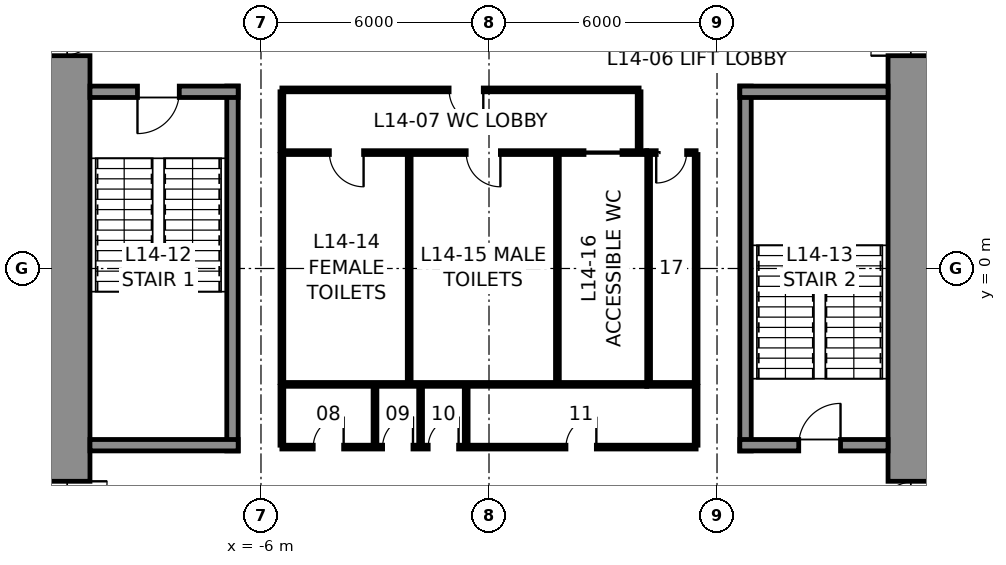
"""IFC4 building model, lengths in metres.
Left out: names, types, materials, properties, quantities, classifications, styles, units other than length and angle.
Written with IfcOpenShell. Run it as: python <this file> out.ifc"""

import sys

from ifc_helpers import new_model, si_unit, direction, frame, frame_2d, origin, place, context, subcontext, project, spatial, rectangle, extrude, element, fill, save


model = new_model("IFC4")
c1 = context("Model", 3, precision=1e-05, world=origin(), true_north=direction((0.0, 1.0)))
c2 = subcontext(c1, "Body", "Model", "MODEL_VIEW")
j1 = project(units=[si_unit("LENGTHUNIT", "METRE"), si_unit("PLANEANGLEUNIT", "RADIAN")], contexts=[c1])
p1 = place(None, origin())
s1 = spatial("IfcSite", under=j1, at=p1, CompositionType="ELEMENT")
p2 = place(p1, origin())
s2 = spatial("IfcBuilding", under=s1, at=p2, CompositionType="ELEMENT")
p3 = place(p2, frame((0.0, 0.0, 76.0)))
s3 = spatial("IfcBuildingStorey", under=s2, at=p3, CompositionType="ELEMENT", Elevation=76.0)
p4 = place(p3, frame((11.25, 10.5, 0.0), z_axis=(0.0, 0.0, 1.0), x_axis=(0.0, -1.0, 0.0)))
e1 = element("IfcWall", 1, at=p4, inside=s3, PredefinedType="SHEAR", context=c2, shape_type="SweptSolid", body=[
    extrude(rectangle(XDim=21.0, YDim=1.5, at=frame_2d((10.5, 0.0))), origin(), (0.0, 0.0, 1.0), 5.0),
])
p5 = place(p4, frame((3.7, 0.0, 0.0)))
e2 = element("IfcOpeningElement", 2, at=p5, cuts=e1, PredefinedType="OPENING", context=c2, shape_type="SweptSolid", body=[
    extrude(rectangle(XDim=1.2, YDim=2.3, at=frame_2d((0.6, 1.15))), frame((0.0, 0.76, 0.0), z_axis=(0.0, -1.0, 0.0), x_axis=(1.0, 0.0, 0.0)), (0.0, 0.0, 1.0), 1.52),
])
p6 = place(p4, frame((16.1, 0.0, 0.0)))
e3 = element("IfcOpeningElement", 3, at=p6, cuts=e1, PredefinedType="OPENING", context=c2, shape_type="SweptSolid", body=[
    extrude(rectangle(XDim=1.2, YDim=2.3, at=frame_2d((0.6, 1.15))), frame((0.0, 0.76, 0.0), z_axis=(0.0, -1.0, 0.0), x_axis=(1.0, 0.0, 0.0)), (0.0, 0.0, 1.0), 1.52),
])
p7 = place(p3, frame((-11.25, -10.5, 0.0), z_axis=(0.0, 0.0, 1.0), x_axis=(0.0, 1.0, 0.0)))
e4 = element("IfcWall", 4, at=p7, inside=s3, PredefinedType="SHEAR", context=c2, shape_type="SweptSolid", body=[
    extrude(rectangle(XDim=21.0, YDim=1.5, at=frame_2d((10.5, 0.0))), origin(), (0.0, 0.0, 1.0), 5.0),
])
p8 = place(p7, frame((16.1, 0.0, 0.0)))
e5 = element("IfcOpeningElement", 5, at=p8, cuts=e4, PredefinedType="OPENING", context=c2, shape_type="SweptSolid", body=[
    extrude(rectangle(XDim=1.2, YDim=2.3, at=frame_2d((0.6, 1.15))), frame((0.0, 0.76, 0.0), z_axis=(0.0, -1.0, 0.0), x_axis=(1.0, 0.0, 0.0)), (0.0, 0.0, 1.0), 1.52),
])
p9 = place(p7, frame((3.7, 0.0, 0.0)))
e6 = element("IfcOpeningElement", 6, at=p9, cuts=e4, PredefinedType="OPENING", context=c2, shape_type="SweptSolid", body=[
    extrude(rectangle(XDim=1.2, YDim=2.3, at=frame_2d((0.6, 1.15))), frame((0.0, 0.76, 0.0), z_axis=(0.0, -1.0, 0.0), x_axis=(1.0, 0.0, 0.0)), (0.0, 0.0, 1.0), 1.52),
])
p10 = place(p3, frame((-6.75, -4.8, 0.0), z_axis=(0.0, 0.0, 1.0), x_axis=(0.0, 1.0, 0.0)))
e7 = element("IfcWall", 7, at=p10, inside=s3, PredefinedType="SOLIDWALL", context=c2, shape_type="SweptSolid", body=[
    extrude(rectangle(XDim=9.6, YDim=0.3, at=frame_2d((4.8, 0.0))), origin(), (0.0, 0.0, 1.0), 4.75),
])
p11 = place(p3, frame((-10.5, 4.65, 0.0), z_axis=(0.0, 0.0, 1.0), x_axis=(1.0, 0.0, 0.0)))
e8 = element("IfcWall", 8, at=p11, inside=s3, PredefinedType="SOLIDWALL", context=c2, shape_type="SweptSolid", body=[
    extrude(rectangle(XDim=3.9, YDim=0.3, at=frame_2d((1.95, 0.0))), origin(), (0.0, 0.0, 1.0), 4.75),
])
p12 = place(p11, frame((1.25, 0.0, 0.0)))
e9 = element("IfcOpeningElement", 9, at=p12, cuts=e8, PredefinedType="OPENING", context=c2, shape_type="SweptSolid", body=[
    extrude(rectangle(XDim=1.1, YDim=2.3, at=frame_2d((0.55, 1.15))), frame((0.0, 0.16, 0.0), z_axis=(0.0, -1.0, 0.0), x_axis=(1.0, 0.0, 0.0)), (0.0, 0.0, 1.0), 0.32),
])
p13 = place(p3, frame((-6.6, -4.65, 0.0), z_axis=(0.0, 0.0, 1.0), x_axis=(-1.0, 0.0, 0.0)))
e10 = element("IfcWall", 10, at=p13, inside=s3, PredefinedType="SOLIDWALL", context=c2, shape_type="SweptSolid", body=[
    extrude(rectangle(XDim=3.9, YDim=0.3, at=frame_2d((1.95, 0.0))), origin(), (0.0, 0.0, 1.0), 4.75),
])
p14 = place(p3, frame((6.75, -4.8, 0.0), z_axis=(0.0, 0.0, 1.0), x_axis=(0.0, 1.0, 0.0)))
e11 = element("IfcWall", 11, at=p14, inside=s3, PredefinedType="SOLIDWALL", context=c2, shape_type="SweptSolid", body=[
    extrude(rectangle(XDim=9.6, YDim=0.3, at=frame_2d((4.8, 0.0))), origin(), (0.0, 0.0, 1.0), 4.75),
])
p15 = place(p3, frame((6.6, 4.65, 0.0), z_axis=(0.0, 0.0, 1.0), x_axis=(1.0, 0.0, 0.0)))
e12 = element("IfcWall", 12, at=p15, inside=s3, PredefinedType="SOLIDWALL", context=c2, shape_type="SweptSolid", body=[
    extrude(rectangle(XDim=3.9, YDim=0.3, at=frame_2d((1.95, 0.0))), origin(), (0.0, 0.0, 1.0), 4.75),
])
p16 = place(p3, frame((10.5, -4.65, 0.0), z_axis=(0.0, 0.0, 1.0), x_axis=(-1.0, 0.0, 0.0)))
e13 = element("IfcWall", 13, at=p16, inside=s3, PredefinedType="SOLIDWALL", context=c2, shape_type="SweptSolid", body=[
    extrude(rectangle(XDim=3.9, YDim=0.3, at=frame_2d((1.95, 0.0))), origin(), (0.0, 0.0, 1.0), 4.75),
])
p17 = place(p16, frame((1.25, 0.0, 0.0)))
e14 = element("IfcOpeningElement", 14, at=p17, cuts=e13, PredefinedType="OPENING", context=c2, shape_type="SweptSolid", body=[
    extrude(rectangle(XDim=1.1, YDim=2.3, at=frame_2d((0.55, 1.15))), frame((0.0, 0.16, 0.0), z_axis=(0.0, -1.0, 0.0), x_axis=(1.0, 0.0, 0.0)), (0.0, 0.0, 1.0), 0.32),
])
p18 = place(p3, frame((-5.45, 3.05, 0.0), z_axis=(0.0, 0.0, 1.0), x_axis=(1.0, 0.0, 0.0)))
e15 = element("IfcWall", 15, at=p18, inside=s3, PredefinedType="PARTITIONING", context=c2, shape_type="SweptSolid", body=[
    extrude(rectangle(XDim=9.6, YDim=0.1, at=frame_2d((4.8, 0.0))), origin(), (0.0, 0.0, 1.0), 4.75),
])
p19 = place(p18, frame((1.25, 0.0, 0.0)))
e16 = element("IfcOpeningElement", 16, at=p19, cuts=e15, PredefinedType="OPENING", context=c2, shape_type="SweptSolid", body=[
    extrude(rectangle(XDim=0.9, YDim=2.3, at=frame_2d((0.45, 1.15))), frame((0.0, 0.06, 0.0), z_axis=(0.0, -1.0, 0.0), x_axis=(1.0, 0.0, 0.0)), (0.0, 0.0, 1.0), 0.12),
])
p20 = place(p18, frame((4.85, 0.0, 0.0)))
e17 = element("IfcOpeningElement", 17, at=p20, cuts=e15, PredefinedType="OPENING", context=c2, shape_type="SweptSolid", body=[
    extrude(rectangle(XDim=0.9, YDim=2.3, at=frame_2d((0.45, 1.15))), frame((0.0, 0.06, 0.0), z_axis=(0.0, -1.0, 0.0), x_axis=(1.0, 0.0, 0.0)), (0.0, 0.0, 1.0), 0.12),
])
p21 = place(p18, frame((7.95, 0.0, 0.0)))
e18 = element("IfcOpeningElement", 18, at=p21, cuts=e15, PredefinedType="OPENING", context=c2, shape_type="SweptSolid", body=[
    extrude(rectangle(XDim=1.0, YDim=2.3, at=frame_2d((0.5, 1.15))), frame((0.0, 0.06, 0.0), z_axis=(0.0, -1.0, 0.0), x_axis=(1.0, 0.0, 0.0)), (0.0, 0.0, 1.0), 0.12),
])
p22 = place(p3, frame((4.15, 3.05, 0.0), z_axis=(0.0, 0.0, 1.0), x_axis=(1.0, 0.0, 0.0)))
e19 = element("IfcWall", 19, at=p22, inside=s3, PredefinedType="PARTITIONING", context=c2, shape_type="SweptSolid", body=[
    extrude(rectangle(XDim=1.3, YDim=0.1, at=frame_2d((0.65, 0.0))), origin(), (0.0, 0.0, 1.0), 4.75),
])
p23 = place(p22, frame((0.25, 0.0, 0.0)))
e20 = element("IfcOpeningElement", 20, at=p23, cuts=e19, PredefinedType="OPENING", context=c2, shape_type="SweptSolid", body=[
    extrude(rectangle(XDim=0.8, YDim=2.3, at=frame_2d((0.4, 1.15))), frame((0.0, 0.06, 0.0), z_axis=(0.0, -1.0, 0.0), x_axis=(1.0, 0.0, 0.0)), (0.0, 0.0, 1.0), 0.12),
])
p24 = place(p3, frame((4.15, -3.05, 0.0), z_axis=(0.0, 0.0, 1.0), x_axis=(-1.0, 0.0, 0.0)))
e21 = element("IfcWall", 21, at=p24, inside=s3, PredefinedType="PARTITIONING", context=c2, shape_type="SweptSolid", body=[
    extrude(rectangle(XDim=9.6, YDim=0.1, at=frame_2d((4.8, 0.0))), origin(), (0.0, 0.0, 1.0), 4.75),
])
p25 = place(p3, frame((5.45, -3.05, 0.0), z_axis=(0.0, 0.0, 1.0), x_axis=(-1.0, 0.0, 0.0)))
e22 = element("IfcWall", 22, at=p25, inside=s3, PredefinedType="PARTITIONING", context=c2, shape_type="SweptSolid", body=[
    extrude(rectangle(XDim=1.3, YDim=0.1, at=frame_2d((0.65, 0.0))), origin(), (0.0, 0.0, 1.0), 4.75),
])
for number, where, z_axis, x_axis in (
    (23, (5.45, 3.0, 0.0), (0.0, 0.0, 1.0), (0.0, -1.0, 0.0)),
    (24, (-5.45, -3.0, 0.0), (0.0, 0.0, 1.0), (0.0, 1.0, 0.0)),
    (25, (-2.1, -3.0, 0.0), (0.0, 0.0, 1.0), (0.0, 1.0, 0.0)),
    (26, (1.8, -3.0, 0.0), (0.0, 0.0, 1.0), (0.0, 1.0, 0.0)),
    (27, (4.2, -3.0, 0.0), (0.0, 0.0, 1.0), (0.0, 1.0, 0.0)),
):
    element("IfcWall", number, at=place(p3, frame(where, z_axis=z_axis, x_axis=x_axis)), inside=s3, PredefinedType="PARTITIONING", context=c2, shape_type="SweptSolid", body=[
        extrude(rectangle(XDim=6.0, YDim=0.1, at=frame_2d((3.0, 0.0))), origin(), (0.0, 0.0, 1.0), 4.75),
    ])
p26 = place(p3, frame((-5.45, 4.7, 0.0), z_axis=(0.0, 0.0, 1.0), x_axis=(1.0, 0.0, 0.0)))
e28 = element("IfcWall", 28, at=p26, inside=s3, PredefinedType="PARTITIONING", context=c2, shape_type="SweptSolid", body=[
    extrude(rectangle(XDim=9.4, YDim=0.1, at=frame_2d((4.7, 0.0))), origin(), (0.0, 0.0, 1.0), 4.75),
])
p27 = place(p26, frame((4.4, 0.0, 0.0)))
e29 = element("IfcOpeningElement", 29, at=p27, cuts=e28, PredefinedType="OPENING", context=c2, shape_type="SweptSolid", body=[
    extrude(rectangle(XDim=0.9, YDim=2.3, at=frame_2d((0.45, 1.15))), frame((0.0, 0.06, 0.0), z_axis=(0.0, -1.0, 0.0), x_axis=(1.0, 0.0, 0.0)), (0.0, 0.0, 1.0), 0.12),
])
for number, where, z_axis, x_axis in (
    (30, (-5.45, 3.1, 0.0), (0.0, 0.0, 1.0), (0.0, 1.0, 0.0)),
    (31, (3.95, 3.1, 0.0), (0.0, 0.0, 1.0), (0.0, 1.0, 0.0)),
):
    element("IfcWall", number, at=place(p3, frame(where, z_axis=z_axis, x_axis=x_axis)), inside=s3, PredefinedType="PARTITIONING", context=c2, shape_type="SweptSolid", body=[
        extrude(rectangle(XDim=1.55, YDim=0.1, at=frame_2d((0.775, 0.0))), origin(), (0.0, 0.0, 1.0), 4.75),
    ])
p28 = place(p3, frame((5.45, -4.7, 0.0), z_axis=(0.0, 0.0, 1.0), x_axis=(-1.0, 0.0, 0.0)))
e32 = element("IfcWall", 32, at=p28, inside=s3, PredefinedType="PARTITIONING", context=c2, shape_type="SweptSolid", body=[
    extrude(rectangle(XDim=10.9, YDim=0.1, at=frame_2d((5.45, 0.0))), origin(), (0.0, 0.0, 1.0), 4.75),
])
p29 = place(p28, frame((9.275, 0.0, 0.0)))
e33 = element("IfcOpeningElement", 33, at=p29, cuts=e32, PredefinedType="OPENING", context=c2, shape_type="SweptSolid", body=[
    extrude(rectangle(XDim=0.8, YDim=2.3, at=frame_2d((0.4, 1.15))), frame((0.0, 0.06, 0.0), z_axis=(0.0, -1.0, 0.0), x_axis=(1.0, 0.0, 0.0)), (0.0, 0.0, 1.0), 0.12),
])
p30 = place(p28, frame((7.45, 0.0, 0.0)))
e34 = element("IfcOpeningElement", 34, at=p30, cuts=e32, PredefinedType="OPENING", context=c2, shape_type="SweptSolid", body=[
    extrude(rectangle(XDim=0.8, YDim=2.3, at=frame_2d((0.4, 1.15))), frame((0.0, 0.06, 0.0), z_axis=(0.0, -1.0, 0.0), x_axis=(1.0, 0.0, 0.0)), (0.0, 0.0, 1.0), 0.12),
])
p31 = place(p28, frame((6.25, 0.0, 0.0)))
e35 = element("IfcOpeningElement", 35, at=p31, cuts=e32, PredefinedType="OPENING", context=c2, shape_type="SweptSolid", body=[
    extrude(rectangle(XDim=0.8, YDim=2.3, at=frame_2d((0.4, 1.15))), frame((0.0, 0.06, 0.0), z_axis=(0.0, -1.0, 0.0), x_axis=(1.0, 0.0, 0.0)), (0.0, 0.0, 1.0), 0.12),
])
p32 = place(p28, frame((2.625, 0.0, 0.0)))
e36 = element("IfcOpeningElement", 36, at=p32, cuts=e32, PredefinedType="OPENING", context=c2, shape_type="SweptSolid", body=[
    extrude(rectangle(XDim=0.8, YDim=2.3, at=frame_2d((0.4, 1.15))), frame((0.0, 0.06, 0.0), z_axis=(0.0, -1.0, 0.0), x_axis=(1.0, 0.0, 0.0)), (0.0, 0.0, 1.0), 0.12),
])
for number, where, z_axis, x_axis in (
    (37, (-5.45, -3.1, 0.0), (0.0, 0.0, 1.0), (0.0, -1.0, 0.0)),
    (38, (5.45, -3.1, 0.0), (0.0, 0.0, 1.0), (0.0, -1.0, 0.0)),
    (39, (-3.0, -3.1, 0.0), (0.0, 0.0, 1.0), (0.0, -1.0, 0.0)),
    (40, (-1.8, -3.1, 0.0), (0.0, 0.0, 1.0), (0.0, -1.0, 0.0)),
    (41, (-0.6, -3.1, 0.0), (0.0, 0.0, 1.0), (0.0, -1.0, 0.0)),
):
    element("IfcWall", number, at=place(p3, frame(where, z_axis=z_axis, x_axis=x_axis)), inside=s3, PredefinedType="PARTITIONING", context=c2, shape_type="SweptSolid", body=[
        extrude(rectangle(XDim=1.55, YDim=0.1, at=frame_2d((0.775, 0.0))), origin(), (0.0, 0.0, 1.0), 4.75),
    ])
p33 = place(p12, frame((1.1, 0.0, 0.0), z_axis=(0.0, 0.0, 1.0), x_axis=(-1.0, 0.0, 0.0)))
e42 = element("IfcDoor", 42, at=p33, inside=s3, OperationType="SINGLE_SWING_RIGHT", PredefinedType="DOOR", context=c2, shape_type="SweptSolid", body=[
    extrude(rectangle(XDim=1.1, YDim=2.3, at=frame_2d((0.55, 1.15))), frame((0.0, 0.025, 0.0), z_axis=(0.0, -1.0, 0.0), x_axis=(1.0, 0.0, 0.0)), (0.0, 0.0, 1.0), 0.05),
])
fill(e9, e42)
p34 = place(p17, frame((1.1, 0.0, 0.0), z_axis=(0.0, 0.0, 1.0), x_axis=(-1.0, 0.0, 0.0)))
e43 = element("IfcDoor", 43, at=p34, inside=s3, OperationType="SINGLE_SWING_RIGHT", PredefinedType="DOOR", context=c2, shape_type="SweptSolid", body=[
    extrude(rectangle(XDim=1.1, YDim=2.3, at=frame_2d((0.55, 1.15))), frame((0.0, 0.025, 0.0), z_axis=(0.0, -1.0, 0.0), x_axis=(1.0, 0.0, 0.0)), (0.0, 0.0, 1.0), 0.05),
])
fill(e14, e43)
p35 = place(p19, frame((0.9, 0.0, 0.0), z_axis=(0.0, 0.0, 1.0), x_axis=(-1.0, 0.0, 0.0)))
e44 = element("IfcDoor", 44, at=p35, inside=s3, OperationType="SINGLE_SWING_LEFT", PredefinedType="DOOR", context=c2, shape_type="SweptSolid", body=[
    extrude(rectangle(XDim=0.9, YDim=2.3, at=frame_2d((0.45, 1.15))), frame((0.0, 0.025, 0.0), z_axis=(0.0, -1.0, 0.0), x_axis=(1.0, 0.0, 0.0)), (0.0, 0.0, 1.0), 0.05),
])
fill(e16, e44)
p36 = place(p20, frame((0.9, 0.0, 0.0), z_axis=(0.0, 0.0, 1.0), x_axis=(-1.0, 0.0, 0.0)))
e45 = element("IfcDoor", 45, at=p36, inside=s3, OperationType="SINGLE_SWING_LEFT", PredefinedType="DOOR", context=c2, shape_type="SweptSolid", body=[
    extrude(rectangle(XDim=0.9, YDim=2.3, at=frame_2d((0.45, 1.15))), frame((0.0, 0.025, 0.0), z_axis=(0.0, -1.0, 0.0), x_axis=(1.0, 0.0, 0.0)), (0.0, 0.0, 1.0), 0.05),
])
fill(e17, e45)
p37 = place(p21, frame((1.0, 0.0, 0.0), z_axis=(0.0, 0.0, 1.0), x_axis=(-1.0, 0.0, 0.0)))
e46 = element("IfcDoor", 46, at=p37, inside=s3, OperationType="SLIDING_TO_LEFT", PredefinedType="DOOR", context=c2, shape_type="SweptSolid", body=[
    extrude(rectangle(XDim=1.0, YDim=2.3, at=frame_2d((0.5, 1.15))), frame((0.0, 0.025, 0.0), z_axis=(0.0, -1.0, 0.0), x_axis=(1.0, 0.0, 0.0)), (0.0, 0.0, 1.0), 0.05),
])
fill(e18, e46)
p38 = place(p23, frame((0.8, 0.0, 0.0), z_axis=(0.0, 0.0, 1.0), x_axis=(-1.0, 0.0, 0.0)))
e47 = element("IfcDoor", 47, at=p38, inside=s3, OperationType="SINGLE_SWING_RIGHT", PredefinedType="DOOR", context=c2, shape_type="SweptSolid", body=[
    extrude(rectangle(XDim=0.8, YDim=2.3, at=frame_2d((0.4, 1.15))), frame((0.0, 0.025, 0.0), z_axis=(0.0, -1.0, 0.0), x_axis=(1.0, 0.0, 0.0)), (0.0, 0.0, 1.0), 0.05),
])
fill(e20, e47)
p39 = place(p27, frame((0.9, 0.0, 0.0), z_axis=(0.0, 0.0, 1.0), x_axis=(-1.0, 0.0, 0.0)))
e48 = element("IfcDoor", 48, at=p39, inside=s3, OperationType="SINGLE_SWING_LEFT", PredefinedType="DOOR", context=c2, shape_type="SweptSolid", body=[
    extrude(rectangle(XDim=0.9, YDim=2.3, at=frame_2d((0.45, 1.15))), frame((0.0, 0.025, 0.0), z_axis=(0.0, -1.0, 0.0), x_axis=(1.0, 0.0, 0.0)), (0.0, 0.0, 1.0), 0.05),
])
fill(e29, e48)
p40 = place(p29, frame((0.8, 0.0, 0.0), z_axis=(0.0, 0.0, 1.0), x_axis=(-1.0, 0.0, 0.0)))
e49 = element("IfcDoor", 49, at=p40, inside=s3, OperationType="SINGLE_SWING_RIGHT", PredefinedType="DOOR", context=c2, shape_type="SweptSolid", body=[
    extrude(rectangle(XDim=0.8, YDim=2.3, at=frame_2d((0.4, 1.15))), frame((0.0, 0.025, 0.0), z_axis=(0.0, -1.0, 0.0), x_axis=(1.0, 0.0, 0.0)), (0.0, 0.0, 1.0), 0.05),
])
fill(e33, e49)
p41 = place(p30, frame((0.8, 0.0, 0.0), z_axis=(0.0, 0.0, 1.0), x_axis=(-1.0, 0.0, 0.0)))
e50 = element("IfcDoor", 50, at=p41, inside=s3, OperationType="SINGLE_SWING_RIGHT", PredefinedType="DOOR", context=c2, shape_type="SweptSolid", body=[
    extrude(rectangle(XDim=0.8, YDim=2.3, at=frame_2d((0.4, 1.15))), frame((0.0, 0.025, 0.0), z_axis=(0.0, -1.0, 0.0), x_axis=(1.0, 0.0, 0.0)), (0.0, 0.0, 1.0), 0.05),
])
fill(e34, e50)
p42 = place(p31, frame((0.8, 0.0, 0.0), z_axis=(0.0, 0.0, 1.0), x_axis=(-1.0, 0.0, 0.0)))
e51 = element("IfcDoor", 51, at=p42, inside=s3, OperationType="SINGLE_SWING_RIGHT", PredefinedType="DOOR", context=c2, shape_type="SweptSolid", body=[
    extrude(rectangle(XDim=0.8, YDim=2.3, at=frame_2d((0.4, 1.15))), frame((0.0, 0.025, 0.0), z_axis=(0.0, -1.0, 0.0), x_axis=(1.0, 0.0, 0.0)), (0.0, 0.0, 1.0), 0.05),
])
fill(e35, e51)
p43 = place(p32, frame((0.8, 0.0, 0.0), z_axis=(0.0, 0.0, 1.0), x_axis=(-1.0, 0.0, 0.0)))
e52 = element("IfcDoor", 52, at=p43, inside=s3, OperationType="SINGLE_SWING_RIGHT", PredefinedType="DOOR", context=c2, shape_type="SweptSolid", body=[
    extrude(rectangle(XDim=0.8, YDim=2.3, at=frame_2d((0.4, 1.15))), frame((0.0, 0.025, 0.0), z_axis=(0.0, -1.0, 0.0), x_axis=(1.0, 0.0, 0.0)), (0.0, 0.0, 1.0), 0.05),
])
fill(e36, e52)
p44 = place(p8, frame((1.2, 0.0, 0.0), z_axis=(0.0, 0.0, 1.0), x_axis=(-1.0, 0.0, 0.0)))
e53 = element("IfcDoor", 53, at=p44, inside=s3, OperationType="SINGLE_SWING_LEFT", PredefinedType="DOOR", context=c2, shape_type="SweptSolid", body=[
    extrude(rectangle(XDim=1.2, YDim=2.3, at=frame_2d((0.6, 1.15))), frame((0.0, 0.025, 0.0), z_axis=(0.0, -1.0, 0.0), x_axis=(1.0, 0.0, 0.0)), (0.0, 0.0, 1.0), 0.05),
])
fill(e5, e53)
p45 = place(p9, frame((1.2, 0.0, 0.0), z_axis=(0.0, 0.0, 1.0), x_axis=(-1.0, 0.0, 0.0)))
e54 = element("IfcDoor", 54, at=p45, inside=s3, OperationType="SINGLE_SWING_LEFT", PredefinedType="DOOR", context=c2, shape_type="SweptSolid", body=[
    extrude(rectangle(XDim=1.2, YDim=2.3, at=frame_2d((0.6, 1.15))), frame((0.0, 0.025, 0.0), z_axis=(0.0, -1.0, 0.0), x_axis=(1.0, 0.0, 0.0)), (0.0, 0.0, 1.0), 0.05),
])
fill(e6, e54)
p46 = place(p5, frame((1.2, 0.0, 0.0), z_axis=(0.0, 0.0, 1.0), x_axis=(-1.0, 0.0, 0.0)))
e55 = element("IfcDoor", 55, at=p46, inside=s3, OperationType="SINGLE_SWING_LEFT", PredefinedType="DOOR", context=c2, shape_type="SweptSolid", body=[
    extrude(rectangle(XDim=1.2, YDim=2.3, at=frame_2d((0.6, 1.15))), frame((0.0, 0.025, 0.0), z_axis=(0.0, -1.0, 0.0), x_axis=(1.0, 0.0, 0.0)), (0.0, 0.0, 1.0), 0.05),
])
fill(e2, e55)
p47 = place(p6, frame((1.2, 0.0, 0.0), z_axis=(0.0, 0.0, 1.0), x_axis=(-1.0, 0.0, 0.0)))
e56 = element("IfcDoor", 56, at=p47, inside=s3, OperationType="SINGLE_SWING_LEFT", PredefinedType="DOOR", context=c2, shape_type="SweptSolid", body=[
    extrude(rectangle(XDim=1.2, YDim=2.3, at=frame_2d((0.6, 1.15))), frame((0.0, 0.025, 0.0), z_axis=(0.0, -1.0, 0.0), x_axis=(1.0, 0.0, 0.0)), (0.0, 0.0, 1.0), 0.05),
])
fill(e3, e56)
save(model, sys.argv[1])
